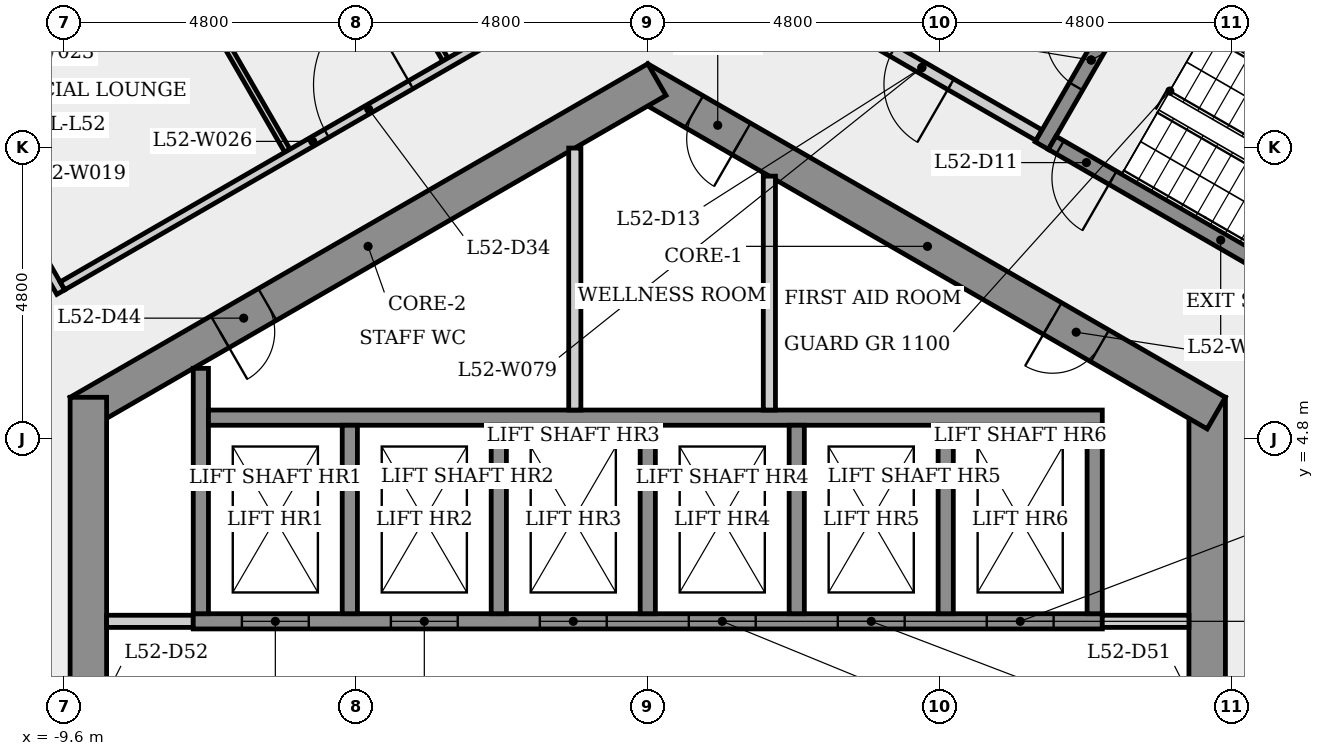
"""IFC4 building model, lengths in metres.
Left out: names, types, materials, properties, quantities, classifications, styles, units other than length and angle.
Written with IfcOpenShell. Run it as: python <this file> out.ifc"""

import sys

from ifc_helpers import new_model, si_unit, direction, frame, frame_2d, origin, place, context, subcontext, project, spatial, rectangle, extrude, element, fill, save


model = new_model("IFC4")
c1 = context("Model", 3, precision=1e-05, world=origin(), true_north=direction((0.0, 1.0)))
c2 = subcontext(c1, "Body", "Model", "MODEL_VIEW")
j1 = project(units=[si_unit("LENGTHUNIT", "METRE"), si_unit("PLANEANGLEUNIT", "RADIAN")], contexts=[c1])
p1 = place(None, origin())
s1 = spatial("IfcSite", under=j1, at=p1, CompositionType="ELEMENT")
p2 = place(p1, origin())
s2 = spatial("IfcBuilding", under=s1, at=p2, CompositionType="ELEMENT")
p3 = place(p2, frame((0.0, 0.0, 194.7)))
s3 = spatial("IfcBuildingStorey", under=s2, at=p3, CompositionType="ELEMENT", Elevation=194.7)
p4 = place(p3, frame((9.2, -5.485, 0.0), z_axis=(0.0, 0.0, 1.0), x_axis=(0.0, 1.0, 0.0)))
e1 = element("IfcWall", 1, at=p4, inside=s3, PredefinedType="SHEAR", context=c2, shape_type="SweptSolid", body=[
    extrude(rectangle(XDim=10.97, YDim=0.6, at=frame_2d((5.485, 0.0))), origin(), (0.0, 0.0, 1.0), 4.0),
])
p5 = place(p4, frame((4.685, 0.0, 0.0)))
e2 = element("IfcOpeningElement", 2, at=p5, cuts=e1, PredefinedType="OPENING", context=c2, shape_type="SweptSolid", body=[
    extrude(rectangle(XDim=1.6, YDim=2.1, at=frame_2d((0.8, 1.05))), frame((0.0, 0.31, 0.0), z_axis=(0.0, -1.0, 0.0), x_axis=(1.0, 0.0, 0.0)), (0.0, 0.0, 1.0), 0.62),
])
p6 = place(p3, frame((9.35, 5.225, 0.0), z_axis=(0.0, 0.0, 1.0), x_axis=(-0.866023993627, 0.500002442456, 0.0)))
e3 = element("IfcWall", 3, at=p6, inside=s3, PredefinedType="SHEAR", context=c2, shape_type="SweptSolid", body=[
    extrude(rectangle(XDim=10.97, YDim=0.6, at=frame_2d((5.485, 0.0))), origin(), (0.0, 0.0, 1.0), 4.0),
])
p7 = place(p6, frame((9.018, 0.0, 0.0)))
e4 = element("IfcOpeningElement", 4, at=p7, cuts=e3, PredefinedType="OPENING", context=c2, shape_type="SweptSolid", body=[
    extrude(rectangle(XDim=0.9, YDim=2.1, at=frame_2d((0.45, 1.05))), frame((0.0, 0.31, 0.0), z_axis=(0.0, -1.0, 0.0), x_axis=(1.0, 0.0, 0.0)), (0.0, 0.0, 1.0), 0.62),
])
p8 = place(p6, frame((2.211, 0.0, 0.0)))
e5 = element("IfcOpeningElement", 5, at=p8, cuts=e3, PredefinedType="OPENING", context=c2, shape_type="SweptSolid", body=[
    extrude(rectangle(XDim=0.9, YDim=2.1, at=frame_2d((0.45, 1.05))), frame((0.0, 0.31, 0.0), z_axis=(0.0, -1.0, 0.0), x_axis=(1.0, 0.0, 0.0)), (0.0, 0.0, 1.0), 0.62),
])
p9 = place(p3, frame((0.15, 10.71, 0.0), z_axis=(0.0, 0.0, 1.0), x_axis=(-0.866023993627, -0.500002442456, 0.0)))
e6 = element("IfcWall", 6, at=p9, inside=s3, PredefinedType="SHEAR", context=c2, shape_type="SweptSolid", body=[
    extrude(rectangle(XDim=10.97, YDim=0.6, at=frame_2d((5.485, 0.0))), origin(), (0.0, 0.0, 1.0), 4.0),
])
p10 = place(p9, frame((7.397, 0.0, 0.0)))
e7 = element("IfcOpeningElement", 7, at=p10, cuts=e6, PredefinedType="OPENING", context=c2, shape_type="SweptSolid", body=[
    extrude(rectangle(XDim=0.9, YDim=2.1, at=frame_2d((0.45, 1.05))), frame((0.0, 0.31, 0.0), z_axis=(0.0, -1.0, 0.0), x_axis=(1.0, 0.0, 0.0)), (0.0, 0.0, 1.0), 0.62),
])
p11 = place(p3, frame((-9.2, 5.485, 0.0), z_axis=(0.0, 0.0, 1.0), x_axis=(0.0, -1.0, 0.0)))
e8 = element("IfcWall", 8, at=p11, inside=s3, PredefinedType="SHEAR", context=c2, shape_type="SweptSolid", body=[
    extrude(rectangle(XDim=10.97, YDim=0.6, at=frame_2d((5.485, 0.0))), origin(), (0.0, 0.0, 1.0), 4.0),
])
p12 = place(p11, frame((8.516, 0.0, 0.0)))
e9 = element("IfcOpeningElement", 9, at=p12, cuts=e8, PredefinedType="OPENING", context=c2, shape_type="SweptSolid", body=[
    extrude(rectangle(XDim=0.9, YDim=2.1, at=frame_2d((0.45, 1.05))), frame((0.0, 0.31, 0.0), z_axis=(0.0, -1.0, 0.0), x_axis=(1.0, 0.0, 0.0)), (0.0, 0.0, 1.0), 0.62),
])
p13 = place(p11, frame((4.685, 0.0, 0.0)))
e10 = element("IfcOpeningElement", 10, at=p13, cuts=e8, PredefinedType="OPENING", context=c2, shape_type="SweptSolid", body=[
    extrude(rectangle(XDim=1.6, YDim=2.1, at=frame_2d((0.8, 1.05))), frame((0.0, 0.31, 0.0), z_axis=(0.0, -1.0, 0.0), x_axis=(1.0, 0.0, 0.0)), (0.0, 0.0, 1.0), 0.62),
])
p14 = place(p3, frame((-17.132, 9.811, 0.0), z_axis=(0.0, 0.0, 1.0), x_axis=(0.866021566356, 0.500006646563, 0.0)))
e11 = element("IfcWall", 11, at=p14, inside=s3, PredefinedType="PARTITIONING", context=c2, shape_type="SweptSolid", body=[
    extrude(rectangle(XDim=9.518, YDim=0.1, at=frame_2d((4.759, 0.0))), origin(), (0.0, 0.0, 1.0), 3.65),
])
p15 = place(p3, frame((-14.708, 30.748, 0.0), z_axis=(0.0, 0.0, 1.0), x_axis=(0.499993923875, -0.866028911808, 0.0)))
e12 = element("IfcWall", 12, at=p15, inside=s3, PredefinedType="PARTITIONING", context=c2, shape_type="SweptSolid", body=[
    extrude(rectangle(XDim=22.758, YDim=0.1, at=frame_2d((11.379, 0.0))), origin(), (0.0, 0.0, 1.0), 3.65),
])
p16 = place(p15, frame((1.731, 0.0, 0.0)))
e13 = element("IfcOpeningElement", 13, at=p16, cuts=e12, PredefinedType="OPENING", context=c2, shape_type="SweptSolid", body=[
    extrude(rectangle(XDim=1.6, YDim=2.1, at=frame_2d((0.8, 1.05))), frame((0.0, 0.06, 0.0), z_axis=(0.0, -1.0, 0.0), x_axis=(1.0, 0.0, 0.0)), (0.0, 0.0, 1.0), 0.12),
])
p17 = place(p15, frame((19.336, 0.0, 0.0)))
e14 = element("IfcOpeningElement", 14, at=p17, cuts=e12, PredefinedType="OPENING", context=c2, shape_type="SweptSolid", body=[
    extrude(rectangle(XDim=1.0, YDim=2.1, at=frame_2d((0.5, 1.05))), frame((0.0, 0.06, 0.0), z_axis=(0.0, -1.0, 0.0), x_axis=(1.0, 0.0, 0.0)), (0.0, 0.0, 1.0), 0.12),
])
p18 = place(p15, frame((13.667, 0.0, 0.0)))
e15 = element("IfcOpeningElement", 15, at=p18, cuts=e12, PredefinedType="OPENING", context=c2, shape_type="SweptSolid", body=[
    extrude(rectangle(XDim=1.6, YDim=2.1, at=frame_2d((0.8, 1.05))), frame((0.0, 0.06, 0.0), z_axis=(0.0, -1.0, 0.0), x_axis=(1.0, 0.0, 0.0)), (0.0, 0.0, 1.0), 0.12),
])
p19 = place(p15, frame((9.746, 0.0, 0.0)))
e16 = element("IfcOpeningElement", 16, at=p19, cuts=e12, PredefinedType="OPENING", context=c2, shape_type="SweptSolid", body=[
    extrude(rectangle(XDim=1.6, YDim=2.1, at=frame_2d((0.8, 1.05))), frame((0.0, 0.06, 0.0), z_axis=(0.0, -1.0, 0.0), x_axis=(1.0, 0.0, 0.0)), (0.0, 0.0, 1.0), 0.12),
])
p20 = place(p15, frame((7.041, 0.0, 0.0)))
e17 = element("IfcOpeningElement", 17, at=p20, cuts=e12, PredefinedType="OPENING", context=c2, shape_type="SweptSolid", body=[
    extrude(rectangle(XDim=1.0, YDim=2.1, at=frame_2d((0.5, 1.05))), frame((0.0, 0.06, 0.0), z_axis=(0.0, -1.0, 0.0), x_axis=(1.0, 0.0, 0.0)), (0.0, 0.0, 1.0), 0.12),
])
p21 = place(p3, frame((-11.894, 11.095, 0.0), z_axis=(0.0, 0.0, 1.0), x_axis=(0.500030632641, -0.866007717299, 0.0)))
e18 = element("IfcWall", 18, at=p21, inside=s3, PredefinedType="PARTITIONING", context=c2, shape_type="SweptSolid", body=[
    extrude(rectangle(XDim=4.48, YDim=0.15, at=frame_2d((2.24, 0.0))), origin(), (0.0, 0.0, 1.0), 3.65),
])
p22 = place(p3, frame((-14.342, 24.115, 0.0), z_axis=(0.0, 0.0, 1.0), x_axis=(0.500000372387, -0.866025188786, 0.0)))
e19 = element("IfcWall", 19, at=p22, inside=s3, PredefinedType="PARTITIONING", context=c2, shape_type="SweptSolid", body=[
    extrude(rectangle(XDim=16.831, YDim=0.1, at=frame_2d((8.415, 0.0))), origin(), (0.0, 0.0, 1.0), 3.65),
])
p23 = place(p22, frame((7.237, 0.0, 0.0)))
e20 = element("IfcOpeningElement", 20, at=p23, cuts=e19, PredefinedType="OPENING", context=c2, shape_type="SweptSolid", body=[
    extrude(rectangle(XDim=1.6, YDim=2.1, at=frame_2d((0.8, 1.05))), frame((0.0, 0.06, 0.0), z_axis=(0.0, -1.0, 0.0), x_axis=(1.0, 0.0, 0.0)), (0.0, 0.0, 1.0), 0.12),
])
p24 = place(p3, frame((-9.626, 7.317, 0.0), z_axis=(0.0, 0.0, 1.0), x_axis=(0.866032896488, 0.499987022033, 0.0)))
e21 = element("IfcWall", 21, at=p24, inside=s3, PredefinedType="PARTITIONING", context=c2, shape_type="SweptSolid", body=[
    extrude(rectangle(XDim=9.506, YDim=0.15, at=frame_2d((4.753, 0.0))), origin(), (0.0, 0.0, 1.0), 3.65),
])
p25 = place(p24, frame((5.015, 0.0, 0.0)))
e22 = element("IfcOpeningElement", 22, at=p25, cuts=e21, PredefinedType="OPENING", context=c2, shape_type="SweptSolid", body=[
    extrude(rectangle(XDim=1.6, YDim=2.1, at=frame_2d((0.8, 1.05))), frame((0.0, 0.085, 0.0), z_axis=(0.0, -1.0, 0.0), x_axis=(1.0, 0.0, 0.0)), (0.0, 0.0, 1.0), 0.17),
])
p26 = place(p3, frame((-8.9, 1.8, 0.0), z_axis=(0.0, 0.0, 1.0), x_axis=(1.0, 0.0, 0.0)))
e23 = element("IfcWall", 23, at=p26, inside=s3, PredefinedType="PARTITIONING", context=c2, shape_type="SweptSolid", body=[
    extrude(rectangle(XDim=1.425, YDim=0.2, at=frame_2d((0.712, 0.0))), origin(), (0.0, 0.0, 1.0), 3.65),
])
p27 = place(p3, frame((-7.475, 1.8, 0.0), z_axis=(0.0, 0.0, 1.0), x_axis=(1.0, 0.0, 0.0)))
e24 = element("IfcWall", 24, at=p27, inside=s3, PredefinedType="SHEAR", context=c2, shape_type="SweptSolid", body=[
    extrude(rectangle(XDim=14.95, YDim=0.25, at=frame_2d((7.475, 0.0))), origin(), (0.0, 0.0, 1.0), 3.65),
])
p28 = place(p27, frame((0.8, 0.0, 0.0)))
e25 = element("IfcOpeningElement", 25, at=p28, cuts=e24, PredefinedType="OPENING", context=c2, shape_type="SweptSolid", body=[
    extrude(rectangle(XDim=1.1, YDim=2.1, at=frame_2d((0.55, 1.05))), frame((0.0, 0.135, 0.0), z_axis=(0.0, -1.0, 0.0), x_axis=(1.0, 0.0, 0.0)), (0.0, 0.0, 1.0), 0.27),
])
p29 = place(p27, frame((3.25, 0.0, 0.0)))
e26 = element("IfcOpeningElement", 26, at=p29, cuts=e24, PredefinedType="OPENING", context=c2, shape_type="SweptSolid", body=[
    extrude(rectangle(XDim=1.1, YDim=2.1, at=frame_2d((0.55, 1.05))), frame((0.0, 0.135, 0.0), z_axis=(0.0, -1.0, 0.0), x_axis=(1.0, 0.0, 0.0)), (0.0, 0.0, 1.0), 0.27),
])
p30 = place(p27, frame((5.7, 0.0, 0.0)))
e27 = element("IfcOpeningElement", 27, at=p30, cuts=e24, PredefinedType="OPENING", context=c2, shape_type="SweptSolid", body=[
    extrude(rectangle(XDim=1.1, YDim=2.1, at=frame_2d((0.55, 1.05))), frame((0.0, 0.135, 0.0), z_axis=(0.0, -1.0, 0.0), x_axis=(1.0, 0.0, 0.0)), (0.0, 0.0, 1.0), 0.27),
])
p31 = place(p27, frame((8.15, 0.0, 0.0)))
e28 = element("IfcOpeningElement", 28, at=p31, cuts=e24, PredefinedType="OPENING", context=c2, shape_type="SweptSolid", body=[
    extrude(rectangle(XDim=1.1, YDim=2.1, at=frame_2d((0.55, 1.05))), frame((0.0, 0.135, 0.0), z_axis=(0.0, -1.0, 0.0), x_axis=(1.0, 0.0, 0.0)), (0.0, 0.0, 1.0), 0.27),
])
p32 = place(p27, frame((10.6, 0.0, 0.0)))
e29 = element("IfcOpeningElement", 29, at=p32, cuts=e24, PredefinedType="OPENING", context=c2, shape_type="SweptSolid", body=[
    extrude(rectangle(XDim=1.1, YDim=2.1, at=frame_2d((0.55, 1.05))), frame((0.0, 0.135, 0.0), z_axis=(0.0, -1.0, 0.0), x_axis=(1.0, 0.0, 0.0)), (0.0, 0.0, 1.0), 0.27),
])
p33 = place(p27, frame((13.05, 0.0, 0.0)))
e30 = element("IfcOpeningElement", 30, at=p33, cuts=e24, PredefinedType="OPENING", context=c2, shape_type="SweptSolid", body=[
    extrude(rectangle(XDim=1.1, YDim=2.1, at=frame_2d((0.55, 1.05))), frame((0.0, 0.135, 0.0), z_axis=(0.0, -1.0, 0.0), x_axis=(1.0, 0.0, 0.0)), (0.0, 0.0, 1.0), 0.27),
])
p34 = place(p3, frame((-7.35, 1.925, 0.0), z_axis=(0.0, 0.0, 1.0), x_axis=(0.0, 1.0, 0.0)))
e31 = element("IfcWall", 31, at=p34, inside=s3, PredefinedType="SHEAR", context=c2, shape_type="SweptSolid", body=[
    extrude(rectangle(XDim=4.036, YDim=0.25, at=frame_2d((2.018, 0.0))), origin(), (0.0, 0.0, 1.0), 3.65),
])
p35 = place(p3, frame((-7.225, 5.15, 0.0), z_axis=(0.0, 0.0, 1.0), x_axis=(1.0, 0.0, 0.0)))
e32 = element("IfcWall", 32, at=p35, inside=s3, PredefinedType="SHEAR", context=c2, shape_type="SweptSolid", body=[
    extrude(rectangle(XDim=14.7, YDim=0.25, at=frame_2d((7.35, 0.0))), origin(), (0.0, 0.0, 1.0), 3.65),
])
for number, where, z_axis, x_axis in (
    (33, (-4.9, 5.025, 0.0), (0.0, 0.0, 1.0), (0.0, -1.0, 0.0)),
    (34, (-2.45, 5.025, 0.0), (0.0, 0.0, 1.0), (0.0, -1.0, 0.0)),
):
    element("IfcWall", number, at=place(p3, frame(where, z_axis=z_axis, x_axis=x_axis)), inside=s3, PredefinedType="SHEAR", context=c2, shape_type="SweptSolid", body=[
        extrude(rectangle(XDim=3.1, YDim=0.25, at=frame_2d((1.55, 0.0))), origin(), (0.0, 0.0, 1.0), 4.0),
    ])
p36 = place(p3, frame((-1.2, 9.584, 0.0), z_axis=(0.0, 0.0, 1.0), x_axis=(0.0, -1.0, 0.0)))
e35 = element("IfcWall", 35, at=p36, inside=s3, PredefinedType="PARTITIONING", context=c2, shape_type="SweptSolid", body=[
    extrude(rectangle(XDim=4.309, YDim=0.2, at=frame_2d((2.155, 0.0))), origin(), (0.0, 0.0, 1.0), 3.65),
])
p37 = place(p3, frame((0.0, 5.025, 0.0), z_axis=(0.0, 0.0, 1.0), x_axis=(0.0, -1.0, 0.0)))
e36 = element("IfcWall", 36, at=p37, inside=s3, PredefinedType="SHEAR", context=c2, shape_type="SweptSolid", body=[
    extrude(rectangle(XDim=3.1, YDim=0.25, at=frame_2d((1.55, 0.0))), origin(), (0.0, 0.0, 1.0), 4.0),
])
p38 = place(p3, frame((2.0, 9.122, 0.0), z_axis=(0.0, 0.0, 1.0), x_axis=(0.0, -1.0, 0.0)))
e37 = element("IfcWall", 37, at=p38, inside=s3, PredefinedType="PARTITIONING", context=c2, shape_type="SweptSolid", body=[
    extrude(rectangle(XDim=3.847, YDim=0.2, at=frame_2d((1.924, 0.0))), origin(), (0.0, 0.0, 1.0), 3.65),
])
for number, where, z_axis, x_axis in (
    (38, (2.45, 5.025, 0.0), (0.0, 0.0, 1.0), (0.0, -1.0, 0.0)),
    (39, (4.9, 5.025, 0.0), (0.0, 0.0, 1.0), (0.0, -1.0, 0.0)),
):
    element("IfcWall", number, at=place(p3, frame(where, z_axis=z_axis, x_axis=x_axis)), inside=s3, PredefinedType="SHEAR", context=c2, shape_type="SweptSolid", body=[
        extrude(rectangle(XDim=3.1, YDim=0.25, at=frame_2d((1.55, 0.0))), origin(), (0.0, 0.0, 1.0), 4.0),
    ])
p39 = place(p3, frame((6.435, 9.795, 0.0), z_axis=(0.0, 0.0, 1.0), x_axis=(-0.866012907634, 0.500021643343, 0.0)))
e40 = element("IfcWall", 40, at=p39, inside=s3, PredefinedType="PARTITIONING", context=c2, shape_type="SweptSolid", body=[
    extrude(rectangle(XDim=4.45, YDim=0.2, at=frame_2d((2.225, 0.0))), origin(), (0.0, 0.0, 1.0), 3.65),
])
p40 = place(p39, frame((1.675, 0.0, 0.0)))
e41 = element("IfcOpeningElement", 41, at=p40, cuts=e40, PredefinedType="OPENING", context=c2, shape_type="SweptSolid", body=[
    extrude(rectangle(XDim=1.1, YDim=2.1, at=frame_2d((0.55, 1.05))), frame((0.0, 0.11, 0.0), z_axis=(0.0, -1.0, 0.0), x_axis=(1.0, 0.0, 0.0)), (0.0, 0.0, 1.0), 0.22),
])
p41 = place(p3, frame((6.48, 9.624, 0.0), z_axis=(0.0, 0.0, 1.0), x_axis=(0.500017246033, 0.866015446554, 0.0)))
e42 = element("IfcWall", 42, at=p41, inside=s3, PredefinedType="SHEAR", context=c2, shape_type="SweptSolid", body=[
    extrude(rectangle(XDim=3.25, YDim=0.25, at=frame_2d((1.625, 0.0))), origin(), (0.0, 0.0, 1.0), 3.65),
])
p42 = place(p41, frame((1.125, 0.0, 0.0)))
e43 = element("IfcOpeningElement", 43, at=p42, cuts=e42, PredefinedType="OPENING", context=c2, shape_type="SweptSolid", body=[
    extrude(rectangle(XDim=1.0, YDim=2.1, at=frame_2d((0.5, 1.05))), frame((0.0, 0.135, 0.0), z_axis=(0.0, -1.0, 0.0), x_axis=(1.0, 0.0, 0.0)), (0.0, 0.0, 1.0), 0.27),
])
p43 = place(p3, frame((7.475, 1.8, 0.0), z_axis=(0.0, 0.0, 1.0), x_axis=(1.0, 0.0, 0.0)))
e44 = element("IfcWall", 44, at=p43, inside=s3, PredefinedType="PARTITIONING", context=c2, shape_type="SweptSolid", body=[
    extrude(rectangle(XDim=1.425, YDim=0.2, at=frame_2d((0.712, 0.0))), origin(), (0.0, 0.0, 1.0), 3.65),
])
p44 = place(p3, frame((7.35, 5.025, 0.0), z_axis=(0.0, 0.0, 1.0), x_axis=(0.0, -1.0, 0.0)))
e45 = element("IfcWall", 45, at=p44, inside=s3, PredefinedType="SHEAR", context=c2, shape_type="SweptSolid", body=[
    extrude(rectangle(XDim=3.1, YDim=0.25, at=frame_2d((1.55, 0.0))), origin(), (0.0, 0.0, 1.0), 4.0),
])
p45 = place(p3, frame((8.151, 12.268, 0.0), z_axis=(0.0, 0.0, 1.0), x_axis=(0.866025499775, -0.499999833739, 0.0)))
e46 = element("IfcWall", 46, at=p45, inside=s3, PredefinedType="SHEAR", context=c2, shape_type="SweptSolid", body=[
    extrude(rectangle(XDim=6.4, YDim=0.25, at=frame_2d((3.2, 0.0))), origin(), (0.0, 0.0, 1.0), 3.65),
])
p46 = place(p3, frame((12.194, 6.47, 0.0), z_axis=(0.0, 0.0, 1.0), x_axis=(-0.866025499775, 0.499999833739, 0.0)))
e47 = element("IfcWall", 47, at=p46, inside=s3, PredefinedType="SHEAR", context=c2, shape_type="SweptSolid", body=[
    extrude(rectangle(XDim=6.4, YDim=0.25, at=frame_2d((3.2, 0.0))), origin(), (0.0, 0.0, 1.0), 3.65),
])
p47 = place(p46, frame((5.25, 0.0, 0.0)))
e48 = element("IfcOpeningElement", 48, at=p47, cuts=e47, PredefinedType="OPENING", context=c2, shape_type="SweptSolid", body=[
    extrude(rectangle(XDim=1.0, YDim=2.1, at=frame_2d((0.5, 1.05))), frame((0.0, 0.135, 0.0), z_axis=(0.0, -1.0, 0.0), x_axis=(1.0, 0.0, 0.0)), (0.0, 0.0, 1.0), 0.27),
])
p48 = place(p28, origin())
e49 = element("IfcDoor", 49, at=p48, inside=s3, OperationType="SLIDING_TO_LEFT", PredefinedType="DOOR", context=c2, shape_type="SweptSolid", body=[
    extrude(rectangle(XDim=1.1, YDim=2.1, at=frame_2d((0.55, 1.05))), frame((0.0, 0.025, 0.0), z_axis=(0.0, -1.0, 0.0), x_axis=(1.0, 0.0, 0.0)), (0.0, 0.0, 1.0), 0.05),
])
fill(e25, e49)
p49 = place(p29, origin())
e50 = element("IfcDoor", 50, at=p49, inside=s3, OperationType="SLIDING_TO_LEFT", PredefinedType="DOOR", context=c2, shape_type="SweptSolid", body=[
    extrude(rectangle(XDim=1.1, YDim=2.1, at=frame_2d((0.55, 1.05))), frame((0.0, 0.025, 0.0), z_axis=(0.0, -1.0, 0.0), x_axis=(1.0, 0.0, 0.0)), (0.0, 0.0, 1.0), 0.05),
])
fill(e26, e50)
p50 = place(p30, origin())
e51 = element("IfcDoor", 51, at=p50, inside=s3, OperationType="SLIDING_TO_LEFT", PredefinedType="DOOR", context=c2, shape_type="SweptSolid", body=[
    extrude(rectangle(XDim=1.1, YDim=2.1, at=frame_2d((0.55, 1.05))), frame((0.0, 0.025, 0.0), z_axis=(0.0, -1.0, 0.0), x_axis=(1.0, 0.0, 0.0)), (0.0, 0.0, 1.0), 0.05),
])
fill(e27, e51)
p51 = place(p31, origin())
e52 = element("IfcDoor", 52, at=p51, inside=s3, OperationType="SLIDING_TO_LEFT", PredefinedType="DOOR", context=c2, shape_type="SweptSolid", body=[
    extrude(rectangle(XDim=1.1, YDim=2.1, at=frame_2d((0.55, 1.05))), frame((0.0, 0.025, 0.0), z_axis=(0.0, -1.0, 0.0), x_axis=(1.0, 0.0, 0.0)), (0.0, 0.0, 1.0), 0.05),
])
fill(e28, e52)
p52 = place(p32, origin())
e53 = element("IfcDoor", 53, at=p52, inside=s3, OperationType="SLIDING_TO_LEFT", PredefinedType="DOOR", context=c2, shape_type="SweptSolid", body=[
    extrude(rectangle(XDim=1.1, YDim=2.1, at=frame_2d((0.55, 1.05))), frame((0.0, 0.025, 0.0), z_axis=(0.0, -1.0, 0.0), x_axis=(1.0, 0.0, 0.0)), (0.0, 0.0, 1.0), 0.05),
])
fill(e29, e53)
p53 = place(p33, origin())
e54 = element("IfcDoor", 54, at=p53, inside=s3, OperationType="SLIDING_TO_LEFT", PredefinedType="DOOR", context=c2, shape_type="SweptSolid", body=[
    extrude(rectangle(XDim=1.1, YDim=2.1, at=frame_2d((0.55, 1.05))), frame((0.0, 0.025, 0.0), z_axis=(0.0, -1.0, 0.0), x_axis=(1.0, 0.0, 0.0)), (0.0, 0.0, 1.0), 0.05),
])
fill(e30, e54)
p54 = place(p47, origin())
e55 = element("IfcDoor", 55, at=p54, inside=s3, OperationType="SINGLE_SWING_LEFT", PredefinedType="DOOR", context=c2, shape_type="SweptSolid", body=[
    extrude(rectangle(XDim=1.0, YDim=2.1, at=frame_2d((0.5, 1.05))), frame((0.0, 0.025, 0.0), z_axis=(0.0, -1.0, 0.0), x_axis=(1.0, 0.0, 0.0)), (0.0, 0.0, 1.0), 0.05),
])
fill(e48, e55)
p55 = place(p42, origin())
e56 = element("IfcDoor", 56, at=p55, inside=s3, OperationType="SINGLE_SWING_RIGHT", PredefinedType="DOOR", context=c2, shape_type="SweptSolid", body=[
    extrude(rectangle(XDim=1.0, YDim=2.1, at=frame_2d((0.5, 1.05))), frame((0.0, 0.025, 0.0), z_axis=(0.0, -1.0, 0.0), x_axis=(1.0, 0.0, 0.0)), (0.0, 0.0, 1.0), 0.05),
])
fill(e43, e56)
p56 = place(p40, origin())
e57 = element("IfcDoor", 57, at=p56, inside=s3, OperationType="SINGLE_SWING_LEFT", PredefinedType="DOOR", context=c2, shape_type="SweptSolid", body=[
    extrude(rectangle(XDim=1.1, YDim=2.1, at=frame_2d((0.55, 1.05))), frame((0.0, 0.025, 0.0), z_axis=(0.0, -1.0, 0.0), x_axis=(1.0, 0.0, 0.0)), (0.0, 0.0, 1.0), 0.05),
])
fill(e41, e57)
p57 = place(p25, origin())
e58 = element("IfcDoor", 58, at=p57, inside=s3, OperationType="SINGLE_SWING_RIGHT", PredefinedType="DOOR", context=c2, shape_type="SweptSolid", body=[
    extrude(rectangle(XDim=1.6, YDim=2.1, at=frame_2d((0.8, 1.05))), frame((0.0, 0.025, 0.0), z_axis=(0.0, -1.0, 0.0), x_axis=(1.0, 0.0, 0.0)), (0.0, 0.0, 1.0), 0.05),
])
fill(e22, e58)
p58 = place(p10, origin())
e59 = element("IfcDoor", 59, at=p58, inside=s3, OperationType="SINGLE_SWING_RIGHT", PredefinedType="DOOR", context=c2, shape_type="SweptSolid", body=[
    extrude(rectangle(XDim=0.9, YDim=2.1, at=frame_2d((0.45, 1.05))), frame((0.0, 0.025, 0.0), z_axis=(0.0, -1.0, 0.0), x_axis=(1.0, 0.0, 0.0)), (0.0, 0.0, 1.0), 0.05),
])
fill(e7, e59)
p59 = place(p7, origin())
e60 = element("IfcDoor", 60, at=p59, inside=s3, OperationType="SINGLE_SWING_LEFT", PredefinedType="DOOR", context=c2, shape_type="SweptSolid", body=[
    extrude(rectangle(XDim=0.9, YDim=2.1, at=frame_2d((0.45, 1.05))), frame((0.0, 0.025, 0.0), z_axis=(0.0, -1.0, 0.0), x_axis=(1.0, 0.0, 0.0)), (0.0, 0.0, 1.0), 0.05),
])
fill(e4, e60)
p60 = place(p8, origin())
e61 = element("IfcDoor", 61, at=p60, inside=s3, OperationType="SINGLE_SWING_RIGHT", PredefinedType="DOOR", context=c2, shape_type="SweptSolid", body=[
    extrude(rectangle(XDim=0.9, YDim=2.1, at=frame_2d((0.45, 1.05))), frame((0.0, 0.025, 0.0), z_axis=(0.0, -1.0, 0.0), x_axis=(1.0, 0.0, 0.0)), (0.0, 0.0, 1.0), 0.05),
])
fill(e5, e61)
save(model, sys.argv[1])
